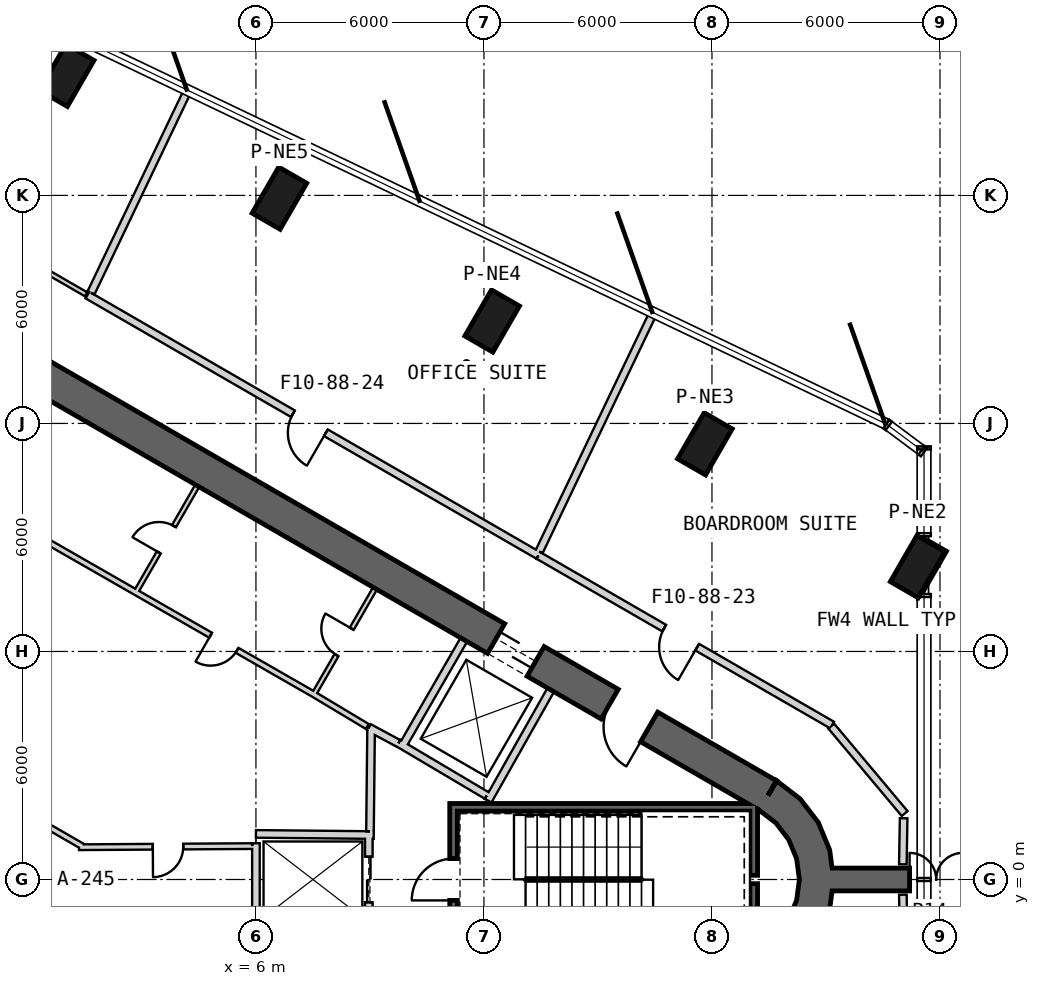
"""IFC4 building model, lengths in metres.
Left out: names, types, materials, properties, quantities, classifications, styles, units other than length and angle.
Written with IfcOpenShell. Run it as: python <this file> out.ifc"""

import sys

from ifc_helpers import new_model, si_unit, direction, frame, frame_2d, origin, origin_2d, place, context, subcontext, project, spatial, polyline, rectangle, outline, extrude, element, fill, save


model = new_model("IFC4")
c1 = context("Model", 3, precision=1e-05, world=origin(), true_north=direction((0.0, 1.0)))
c2 = subcontext(c1, "Body", "Model", "MODEL_VIEW")
j1 = project(units=[si_unit("LENGTHUNIT", "METRE"), si_unit("PLANEANGLEUNIT", "RADIAN")], contexts=[c1])
p1 = place(None, origin())
s1 = spatial("IfcSite", under=j1, at=p1, CompositionType="ELEMENT")
p2 = place(p1, origin())
s2 = spatial("IfcBuilding", under=s1, at=p2, CompositionType="ELEMENT")
p3 = place(p2, frame((0.0, 0.0, 380.6)))
s3 = spatial("IfcBuildingStorey", under=s2, at=p3, CompositionType="ELEMENT", Elevation=380.6)
for number, where, z_axis, x_axis in (
    (1, (23.412, 8.231, 0.0), (0.0, 0.0, 1.0), (0.5, 0.866, 0.0)),
    (2, (17.814, 11.463, 0.0), (0.0, 0.0, 1.0), (0.5, 0.866, 0.0)),
    (3, (12.216, 14.695, 0.0), (0.0, 0.0, 1.0), (0.5, 0.866, 0.0)),
    (4, (6.618, 17.927, 0.0), (0.0, 0.0, 1.0), (0.5, 0.866, 0.0)),
    (5, (1.02, 21.159, 0.0), (0.0, 0.0, 1.0), (0.5, 0.866, 0.0)),
):
    element("IfcColumn", number, at=place(p3, frame(where, z_axis=z_axis, x_axis=x_axis)), inside=s3, PredefinedType="COLUMN", context=c2, shape_type="SweptSolid", body=[
        extrude(rectangle(XDim=1.4, YDim=0.85, at=origin_2d()), origin(), (0.0, 0.0, 1.0), 3.9),
    ])
p4 = place(p3, frame((19.475, 2.208, 0.0), z_axis=(0.0, 0.0, 1.0), x_axis=(-0.866028369851, 0.499994862586, 0.0)))
e6 = element("IfcWall", 6, at=p4, inside=s3, PredefinedType="SHEAR", context=c2, shape_type="SweptSolid", body=[
    extrude(rectangle(XDim=31.523, YDim=0.9, at=frame_2d((15.762, 0.0))), origin(), (0.0, 0.0, 1.0), 3.9),
])
p5 = place(p4, frame((7.062, 0.0, 0.0)))
e7 = element("IfcOpeningElement", 7, at=p5, cuts=e6, PredefinedType="OPENING", context=c2, shape_type="SweptSolid", body=[
    extrude(rectangle(XDim=1.2, YDim=2.4, at=frame_2d((0.6, 1.2))), frame((0.0, 0.46, 0.0), z_axis=(0.0, -1.0, 0.0), x_axis=(1.0, 0.0, 0.0)), (0.0, 0.0, 1.0), 0.92),
])
p6 = place(p4, frame((3.612, 0.0, 0.0)))
e8 = element("IfcOpeningElement", 8, at=p6, cuts=e6, PredefinedType="OPENING", context=c2, shape_type="SweptSolid", body=[
    extrude(rectangle(XDim=1.2, YDim=2.4, at=frame_2d((0.6, 1.2))), frame((0.0, 0.46, 0.0), z_axis=(0.0, -1.0, 0.0), x_axis=(1.0, 0.0, 0.0)), (0.0, 0.0, 1.0), 0.92),
])
p7 = place(p4, frame((26.712, 0.0, 0.0)))
e9 = element("IfcOpeningElement", 9, at=p7, cuts=e6, PredefinedType="OPENING", context=c2, shape_type="SweptSolid", body=[
    extrude(rectangle(XDim=1.2, YDim=2.4, at=frame_2d((0.6, 1.2))), frame((0.0, 0.46, 0.0), z_axis=(0.0, -1.0, 0.0), x_axis=(1.0, 0.0, 0.0)), (0.0, 0.0, 1.0), 0.92),
])
p8 = place(p3, origin())
e10 = element("IfcWall", 10, at=p8, inside=s3, PredefinedType="SHEAR", context=c2, shape_type="SweptSolid", body=[
    extrude(outline(polyline([(19.7, -2.598), (20.321, -2.121), (20.798, -1.5), (21.098, -0.777), (21.2, 0.0), (21.098, 0.777), (20.798, 1.5), (20.321, 2.121), (19.7, 2.598), (19.25, 1.819), (19.685, 1.485), (20.019, 1.05), (20.229, 0.543), (20.3, 0.0), (20.229, -0.543), (20.019, -1.05), (19.685, -1.485), (19.25, -1.819), (19.7, -2.598)])), origin(), (0.0, 0.0, 1.0), 3.9),
])
p9 = place(p3, frame((21.15, 0.0, 0.0), z_axis=(0.0, 0.0, 1.0), x_axis=(1.0, 0.0, 0.0)))
e11 = element("IfcWall", 11, at=p9, inside=s3, PredefinedType="SHEAR", context=c2, shape_type="SweptSolid", body=[
    extrude(rectangle(XDim=6.455, YDim=0.6, at=frame_2d((3.228, 0.0))), origin(), (0.0, 0.0, 1.0), 3.9),
])
p10 = place(p9, frame((2.05, 0.0, 0.0)))
e12 = element("IfcOpeningElement", 12, at=p10, cuts=e11, PredefinedType="OPENING", context=c2, shape_type="SweptSolid", body=[
    extrude(rectangle(XDim=1.4, YDim=2.4, at=frame_2d((0.7, 1.2))), frame((0.0, 0.31, 0.0), z_axis=(0.0, -1.0, 0.0), x_axis=(1.0, 0.0, 0.0)), (0.0, 0.0, 1.0), 0.62),
])
p11 = place(p3, frame((23.426, 7.345, 1.1), z_axis=(0.0, 0.0, 1.0), x_axis=(0.499991248344, 0.866030456496, 0.0)))
e13 = element("IfcWall", 13, at=p11, inside=s3, PredefinedType="SOLIDWALL", context=c2, shape_type="SweptSolid", body=[
    extrude(rectangle(XDim=1.52, YDim=0.06, at=frame_2d((0.76, 0.0))), origin(), (0.0, 0.0, 1.0), 1.51),
])
p12 = place(p3, frame((24.145, 8.65, 0.0), z_axis=(0.0, 0.0, 1.0), x_axis=(-0.865989465428, 0.500062241894, 0.0)))
e14 = element("IfcWall", 14, at=p12, inside=s3, PredefinedType="SOLIDWALL", context=c2, shape_type="SweptSolid", body=[
    extrude(rectangle(XDim=0.85, YDim=0.06, at=frame_2d((0.425, 0.0))), origin(), (0.0, 0.0, 1.0), 3.21),
])
p13 = place(p3, frame((9.847, 3.495, 0.0), z_axis=(0.0, 0.0, 1.0), x_axis=(0.499984717929, 0.866034226713, 0.0)))
e15 = element("IfcWall", 15, at=p13, inside=s3, PredefinedType="PLUMBINGWALL", context=c2, shape_type="SweptSolid", body=[
    extrude(rectangle(XDim=3.25, YDim=0.2, at=frame_2d((1.625, 0.0))), origin(), (0.0, 0.0, 1.0), 3.6),
])
p14 = place(p3, frame((12.11, 2.073, 0.0), z_axis=(0.0, 0.0, 1.0), x_axis=(0.49196600604, 0.870614408852, 0.0)))
e16 = element("IfcWall", 16, at=p14, inside=s3, PredefinedType="PLUMBINGWALL", context=c2, shape_type="SweptSolid", body=[
    extrude(rectangle(XDim=3.35, YDim=0.2, at=frame_2d((1.675, 0.0))), origin(), (0.0, 0.0, 1.0), 3.6),
])
p15 = place(p3, frame((12.073, 2.211, 0.0), z_axis=(0.0, 0.0, 1.0), x_axis=(-0.860414880418, 0.509594185166, 0.0)))
e17 = element("IfcWall", 17, at=p15, inside=s3, PredefinedType="PLUMBINGWALL", context=c2, shape_type="SweptSolid", body=[
    extrude(rectangle(XDim=2.7, YDim=0.2, at=frame_2d((1.35, 0.0))), origin(), (0.0, 0.0, 1.0), 3.6),
])
p16 = place(p3, frame((19.2, 1.9, -0.3), z_axis=(0.0, 0.0, 1.0), x_axis=(-1.0, 0.0, 0.0)))
e18 = element("IfcWall", 18, at=p16, inside=s3, PredefinedType="SHEAR", context=c2, shape_type="SweptSolid", body=[
    extrude(rectangle(XDim=8.1, YDim=0.2, at=frame_2d((4.05, 0.0))), origin(), (0.0, 0.0, 1.0), 3.9),
])
p17 = place(p3, frame((19.1, -2.0, -0.3), z_axis=(0.0, 0.0, 1.0), x_axis=(0.0, 1.0, 0.0)))
e19 = element("IfcWall", 19, at=p17, inside=s3, PredefinedType="SHEAR", context=c2, shape_type="SweptSolid", body=[
    extrude(rectangle(XDim=1.89, YDim=0.2, at=frame_2d((0.945, 0.0))), origin(), (0.0, 0.0, 1.0), 3.9),
])
p18 = place(p3, frame((19.1, 0.11, -0.3), z_axis=(0.0, 0.0, 1.0), x_axis=(0.0, 1.0, 0.0)))
e20 = element("IfcWall", 20, at=p18, inside=s3, PredefinedType="SHEAR", context=c2, shape_type="SweptSolid", body=[
    extrude(rectangle(XDim=1.69, YDim=0.2, at=frame_2d((0.845, 0.0))), origin(), (0.0, 0.0, 1.0), 3.9),
])
p19 = place(p3, frame((11.2, -1.8, -0.3), z_axis=(0.0, 0.0, 1.0), x_axis=(0.0, 1.0, 0.0)))
e21 = element("IfcWall", 21, at=p19, inside=s3, PredefinedType="SHEAR", context=c2, shape_type="SweptSolid", body=[
    extrude(rectangle(XDim=3.6, YDim=0.2, at=frame_2d((1.8, 0.0))), origin(), (0.0, 0.0, 1.0), 3.9),
])
p20 = place(p19, frame((1.25, 0.0, 0.3)))
e22 = element("IfcOpeningElement", 22, at=p20, cuts=e21, PredefinedType="OPENING", context=c2, shape_type="SweptSolid", body=[
    extrude(rectangle(XDim=1.1, YDim=2.1, at=frame_2d((0.55, 1.05))), frame((0.0, 0.11, 0.0), z_axis=(0.0, -1.0, 0.0), x_axis=(1.0, 0.0, 0.0)), (0.0, 0.0, 1.0), 0.22),
])
p21 = place(p3, frame((8.97, 1.2, 0.0), z_axis=(0.0, 0.0, 1.0), x_axis=(0.0, -1.0, 0.0)))
e23 = element("IfcWall", 23, at=p21, inside=s3, PredefinedType="PLUMBINGWALL", context=c2, shape_type="SweptSolid", body=[
    extrude(rectangle(XDim=2.4, YDim=0.2, at=frame_2d((1.2, 0.0))), origin(), (0.0, 0.0, 1.0), 3.6),
])
p22 = place(p21, frame((0.6, 0.0, 0.0)))
e24 = element("IfcOpeningElement", 24, at=p22, cuts=e23, PredefinedType="OPENING", context=c2, shape_type="SweptSolid", body=[
    extrude(rectangle(XDim=1.2, YDim=2.4, at=frame_2d((0.6, 1.2))), frame((0.0, 0.11, 0.0), z_axis=(0.0, -1.0, 0.0), x_axis=(1.0, 0.0, 0.0)), (0.0, 0.0, 1.0), 0.22),
])
p23 = place(p3, frame((6.0, -1.104, 0.0), z_axis=(0.0, 0.0, 1.0), x_axis=(0.0, 1.0, 0.0)))
e25 = element("IfcWall", 25, at=p23, inside=s3, PredefinedType="PLUMBINGWALL", context=c2, shape_type="SweptSolid", body=[
    extrude(rectangle(XDim=2.405, YDim=0.2, at=frame_2d((1.202, 0.0))), origin(), (0.0, 0.0, 1.0), 3.6),
])
p24 = place(p3, frame((9.1, 1.169, 0.0), z_axis=(0.0, 0.0, 1.0), x_axis=(-0.99994990606, 0.010009264196, 0.0)))
e26 = element("IfcWall", 26, at=p24, inside=s3, PredefinedType="PLUMBINGWALL", context=c2, shape_type="SweptSolid", body=[
    extrude(rectangle(XDim=3.0, YDim=0.2, at=frame_2d((1.5, 0.0))), origin(), (0.0, 0.0, 1.0), 3.6),
])
p25 = place(p3, frame((4.457, 10.359, 0.0), z_axis=(0.0, 0.0, 1.0), x_axis=(-0.500017246033, -0.866015446554, 0.0)))
e27 = element("IfcWall", 27, at=p25, inside=s3, PredefinedType="PARTITIONING", context=c2, shape_type="SweptSolid", body=[
    extrude(rectangle(XDim=3.25, YDim=0.12, at=frame_2d((1.625, 0.0))), origin(), (0.0, 0.0, 1.0), 3.6),
])
p26 = place(p3, frame((8.974, 3.999, 0.0), z_axis=(0.0, 0.0, 1.0), x_axis=(0.880917147855, -0.473270513147, 0.0)))
e28 = element("IfcWall", 28, at=p26, inside=s3, PredefinedType="PARTITIONING", context=c2, shape_type="SweptSolid", body=[
    extrude(rectangle(XDim=0.878, YDim=0.2, at=frame_2d((0.439, 0.0))), origin(), (0.0, 0.0, 1.0), 3.6),
])
p27 = place(p3, frame((7.53, 4.833, 0.0), z_axis=(0.0, 0.0, 1.0), x_axis=(-0.863270393362, 0.50474174381, 0.0)))
e29 = element("IfcWall", 29, at=p27, inside=s3, PredefinedType="PLUMBINGWALL", context=c2, shape_type="SweptSolid", body=[
    extrude(rectangle(XDim=5.455, YDim=0.15, at=frame_2d((2.728, 0.0))), origin(), (0.0, 0.0, 1.0), 3.6),
])
p28 = place(p3, frame((7.55, 4.821, 0.0), z_axis=(0.0, 0.0, 1.0), x_axis=(0.866019818373, -0.500009674092, 0.0)))
e30 = element("IfcWall", 30, at=p28, inside=s3, PredefinedType="PARTITIONING", context=c2, shape_type="SweptSolid", body=[
    extrude(rectangle(XDim=1.594, YDim=0.12, at=frame_2d((0.797, 0.0))), origin(), (0.0, 0.0, 1.0), 3.6),
])
p29 = place(p28, frame((0.397, 0.0, 0.0)))
e31 = element("IfcOpeningElement", 31, at=p29, cuts=e30, PredefinedType="OPENING", context=c2, shape_type="SweptSolid", body=[
    extrude(rectangle(XDim=0.8, YDim=2.1, at=frame_2d((0.4, 1.05))), frame((0.0, 0.07, 0.0), z_axis=(0.0, -1.0, 0.0), x_axis=(1.0, 0.0, 0.0)), (0.0, 0.0, 1.0), 0.14),
])
p30 = place(p3, frame((2.821, 7.586, 0.0), z_axis=(0.0, 0.0, 1.0), x_axis=(-0.871409832999, 0.490555708306, 0.0)))
e32 = element("IfcWall", 32, at=p30, inside=s3, PredefinedType="PLUMBINGWALL", context=c2, shape_type="SweptSolid", body=[
    extrude(rectangle(XDim=2.755, YDim=0.15, at=frame_2d((1.377, 0.0))), origin(), (0.0, 0.0, 1.0), 3.6),
])
p31 = place(p3, frame((9.001, 1.27, 0.0), z_axis=(0.0, 0.0, 1.0), x_axis=(0.010723968736, 0.999942496594, 0.0)))
e33 = element("IfcWall", 33, at=p31, inside=s3, PredefinedType="PARTITIONING", context=c2, shape_type="SweptSolid", body=[
    extrude(rectangle(XDim=2.709, YDim=0.2, at=frame_2d((1.354, 0.0))), origin(), (0.0, 0.0, 1.0), 3.6),
])
p32 = place(p31, frame((0.848, 0.0, 0.0)))
e34 = element("IfcOpeningElement", 34, at=p32, cuts=e33, PredefinedType="OPENING", context=c2, shape_type="SweptSolid", body=[
    extrude(rectangle(XDim=1.0, YDim=2.1, at=frame_2d((0.5, 1.05))), frame((0.0, 0.11, 0.0), z_axis=(0.0, -1.0, 0.0), x_axis=(1.0, 0.0, 0.0)), (0.0, 0.0, 1.0), 0.22),
])
p33 = place(p3, frame((7.501, 2.625, 0.0), z_axis=(0.0, 0.0, 1.0), x_axis=(-0.011798588722, 0.99993039423, 0.0)))
e35 = element("IfcWall", 35, at=p33, inside=s3, PredefinedType="PLUMBINGWALL", context=c2, shape_type="SweptSolid", body=[
    extrude(rectangle(XDim=2.152, YDim=0.15, at=frame_2d((1.076, 0.0))), origin(), (0.0, 0.0, 1.0), 3.6),
])
p34 = place(p3, frame((4.425, 2.7, 0.0), z_axis=(0.0, 0.0, 1.0), x_axis=(1.0, 0.0, 0.0)))
e36 = element("IfcWall", 36, at=p34, inside=s3, PredefinedType="PLUMBINGWALL", context=c2, shape_type="SweptSolid", body=[
    extrude(rectangle(XDim=3.0, YDim=0.15, at=frame_2d((1.5, 0.0))), origin(), (0.0, 0.0, 1.0), 3.6),
])
p35 = place(p34, frame((1.137, 0.0, 0.0)))
e37 = element("IfcOpeningElement", 37, at=p35, cuts=e36, PredefinedType="OPENING", context=c2, shape_type="SweptSolid", body=[
    extrude(rectangle(XDim=0.8, YDim=2.1, at=frame_2d((0.4, 1.05))), frame((0.0, 0.085, 0.0), z_axis=(0.0, -1.0, 0.0), x_axis=(1.0, 0.0, 0.0)), (0.0, 0.0, 1.0), 0.17),
])
p36 = place(p3, frame((4.5, 0.925, 0.0), z_axis=(0.0, 0.0, 1.0), x_axis=(0.0, 1.0, 0.0)))
e38 = element("IfcWall", 38, at=p36, inside=s3, PredefinedType="PLUMBINGWALL", context=c2, shape_type="SweptSolid", body=[
    extrude(rectangle(XDim=1.7, YDim=0.15, at=frame_2d((0.85, 0.0))), origin(), (0.0, 0.0, 1.0), 3.6),
])
p37 = place(p3, frame((1.516, 1.0, 0.0), z_axis=(0.0, 0.0, 1.0), x_axis=(1.0, 0.0, 0.0)))
e39 = element("IfcWall", 39, at=p37, inside=s3, PredefinedType="PLUMBINGWALL", context=c2, shape_type="SweptSolid", body=[
    extrude(rectangle(XDim=2.909, YDim=0.15, at=frame_2d((1.455, 0.0))), origin(), (0.0, 0.0, 1.0), 3.6),
])
p38 = place(p3, frame((-0.069, 1.99, 0.0), z_axis=(0.0, 0.0, 1.0), x_axis=(0.866015184065, -0.500017700655, 0.0)))
e40 = element("IfcWall", 40, at=p38, inside=s3, PredefinedType="PLUMBINGWALL", context=c2, shape_type="SweptSolid", body=[
    extrude(rectangle(XDim=1.957, YDim=0.15, at=frame_2d((0.978, 0.0))), origin(), (0.0, 0.0, 1.0), 3.6),
])
p39 = place(p3, frame((21.126, 4.084, 0.0), z_axis=(0.0, 0.0, 1.0), x_axis=(-0.866025296335, 0.500000186108, 0.0)))
e41 = element("IfcWall", 41, at=p39, inside=s3, PredefinedType="PARTITIONING", context=c2, shape_type="SweptSolid", body=[
    extrude(rectangle(XDim=22.523, YDim=0.12, at=frame_2d((11.262, 0.0))), origin(), (0.0, 0.0, 1.0), 2.97),
])
p40 = place(p39, frame((10.86, 0.0, 0.0)))
e42 = element("IfcOpeningElement", 42, at=p40, cuts=e41, PredefinedType="OPENING", context=c2, shape_type="SweptSolid", body=[
    extrude(rectangle(XDim=1.0, YDim=2.1, at=frame_2d((0.5, 1.05))), frame((0.0, 0.07, 0.0), z_axis=(0.0, -1.0, 0.0), x_axis=(1.0, 0.0, 0.0)), (0.0, 0.0, 1.0), 0.14),
])
p41 = place(p3, frame((1.62, 15.346, 0.0), z_axis=(0.0, 0.0, 1.0), x_axis=(-0.866024423855, 0.500001697284, 0.0)))
e43 = element("IfcWall", 43, at=p41, inside=s3, PredefinedType="PARTITIONING", context=c2, shape_type="SweptSolid", body=[
    extrude(rectangle(XDim=9.864, YDim=0.12, at=frame_2d((4.932, 0.0))), origin(), (0.0, 0.0, 1.0), 2.97),
])
p42 = place(p41, frame((4.435, 0.0, 0.0)))
e44 = element("IfcOpeningElement", 44, at=p42, cuts=e43, PredefinedType="OPENING", context=c2, shape_type="SweptSolid", body=[
    extrude(rectangle(XDim=1.0, YDim=2.1, at=frame_2d((0.5, 1.05))), frame((0.0, 0.07, 0.0), z_axis=(0.0, -1.0, 0.0), x_axis=(1.0, 0.0, 0.0)), (0.0, 0.0, 1.0), 0.14),
])
p43 = place(p3, frame((23.061, 1.747, 0.0), z_axis=(0.0, 0.0, 1.0), x_axis=(-0.642780078291, 0.766050762647, 0.0)))
e45 = element("IfcWall", 45, at=p43, inside=s3, PredefinedType="PARTITIONING", context=c2, shape_type="SweptSolid", body=[
    extrude(rectangle(XDim=3.03, YDim=0.12, at=frame_2d((1.515, 0.0))), origin(), (0.0, 0.0, 1.0), 3.6),
])
p44 = place(p3, frame((23.023, 0.4, 0.0), z_axis=(0.0, 0.0, 1.0), x_axis=(0.017073489471, 0.999854237355, 0.0)))
e46 = element("IfcWall", 46, at=p44, inside=s3, PredefinedType="PARTITIONING", context=c2, shape_type="SweptSolid", body=[
    extrude(rectangle(XDim=1.273, YDim=0.12, at=frame_2d((0.636, 0.0))), origin(), (0.0, 0.0, 1.0), 3.6),
])
p45 = place(p3, frame((4.207, 20.766, 0.0), z_axis=(0.0, 0.0, 1.0), x_axis=(-0.431077681357, -0.902314819027, 0.0)))
e47 = element("IfcWall", 47, at=p45, inside=s3, PredefinedType="PARTITIONING", context=c2, shape_type="SweptSolid", body=[
    extrude(rectangle(XDim=5.946, YDim=0.12, at=frame_2d((2.973, 0.0))), origin(), (0.0, 0.0, 1.0), 3.6),
])
p46 = place(p3, frame((23.047, -1.801, 0.0), z_axis=(0.0, 0.0, 1.0), x_axis=(-0.017070682919, 0.999854285276, 0.0)))
e48 = element("IfcWall", 48, at=p46, inside=s3, PredefinedType="PARTITIONING", context=c2, shape_type="SweptSolid", body=[
    extrude(rectangle(XDim=1.402, YDim=0.2, at=frame_2d((0.701, 0.0))), origin(), (0.0, 0.0, 1.0), 3.6),
])
p47 = place(p20, origin())
e49 = element("IfcDoor", 49, at=p47, inside=s3, OperationType="SINGLE_SWING_RIGHT", PredefinedType="USERDEFINED", context=c2, shape_type="SweptSolid", body=[
    extrude(rectangle(XDim=1.1, YDim=2.1, at=frame_2d((0.55, 1.05))), frame((0.0, 0.025, 0.0), z_axis=(0.0, -1.0, 0.0), x_axis=(1.0, 0.0, 0.0)), (0.0, 0.0, 1.0), 0.05),
])
fill(e22, e49)
p48 = place(p32, origin())
e50 = element("IfcDoor", 50, at=p48, inside=s3, OperationType="SINGLE_SWING_RIGHT", PredefinedType="USERDEFINED", context=c2, shape_type="SweptSolid", body=[
    extrude(rectangle(XDim=1.0, YDim=2.1, at=frame_2d((0.5, 1.05))), frame((0.0, 0.025, 0.0), z_axis=(0.0, -1.0, 0.0), x_axis=(1.0, 0.0, 0.0)), (0.0, 0.0, 1.0), 0.05),
])
fill(e34, e50)
p49 = place(p22, origin())
e51 = element("IfcDoor", 51, at=p49, inside=s3, OperationType="SLIDING_TO_LEFT", PredefinedType="USERDEFINED", context=c2, shape_type="SweptSolid", body=[
    extrude(rectangle(XDim=1.2, YDim=2.4, at=frame_2d((0.6, 1.2))), frame((0.0, 0.025, 0.0), z_axis=(0.0, -1.0, 0.0), x_axis=(1.0, 0.0, 0.0)), (0.0, 0.0, 1.0), 0.05),
])
fill(e24, e51)
p50 = place(p35, origin())
e52 = element("IfcDoor", 52, at=p50, inside=s3, OperationType="SINGLE_SWING_RIGHT", PredefinedType="USERDEFINED", context=c2, shape_type="SweptSolid", body=[
    extrude(rectangle(XDim=0.8, YDim=2.1, at=frame_2d((0.4, 1.05))), frame((0.0, 0.025, 0.0), z_axis=(0.0, -1.0, 0.0), x_axis=(1.0, 0.0, 0.0)), (0.0, 0.0, 1.0), 0.05),
])
fill(e37, e52)
p51 = place(p29, origin())
e53 = element("IfcDoor", 53, at=p51, inside=s3, OperationType="SINGLE_SWING_LEFT", PredefinedType="USERDEFINED", context=c2, shape_type="SweptSolid", body=[
    extrude(rectangle(XDim=0.8, YDim=2.1, at=frame_2d((0.4, 1.05))), frame((0.0, 0.025, 0.0), z_axis=(0.0, -1.0, 0.0), x_axis=(1.0, 0.0, 0.0)), (0.0, 0.0, 1.0), 0.05),
])
fill(e31, e53)
p52 = place(p40, origin())
e54 = element("IfcDoor", 54, at=p52, inside=s3, OperationType="SINGLE_SWING_LEFT", PredefinedType="NOTDEFINED", context=c2, shape_type="SweptSolid", body=[
    extrude(rectangle(XDim=1.0, YDim=2.1, at=frame_2d((0.5, 1.05))), frame((0.0, 0.025, 0.0), z_axis=(0.0, -1.0, 0.0), x_axis=(1.0, 0.0, 0.0)), (0.0, 0.0, 1.0), 0.05),
])
fill(e42, e54)
p53 = place(p5, origin())
e55 = element("IfcDoor", 55, at=p53, inside=s3, OperationType="SLIDING_TO_LEFT", PredefinedType="USERDEFINED", context=c2, shape_type="SweptSolid", body=[
    extrude(rectangle(XDim=1.2, YDim=2.4, at=frame_2d((0.6, 1.2))), frame((0.0, 0.025, 0.0), z_axis=(0.0, -1.0, 0.0), x_axis=(1.0, 0.0, 0.0)), (0.0, 0.0, 1.0), 0.05),
])
fill(e7, e55)
p54 = place(p6, origin())
e56 = element("IfcDoor", 56, at=p54, inside=s3, OperationType="SINGLE_SWING_LEFT", PredefinedType="USERDEFINED", context=c2, shape_type="SweptSolid", body=[
    extrude(rectangle(XDim=1.2, YDim=2.4, at=frame_2d((0.6, 1.2))), frame((0.0, 0.025, 0.0), z_axis=(0.0, -1.0, 0.0), x_axis=(1.0, 0.0, 0.0)), (0.0, 0.0, 1.0), 0.05),
])
fill(e8, e56)
p55 = place(p10, origin())
e57 = element("IfcDoor", 57, at=p55, inside=s3, OperationType="DOUBLE_DOOR_SINGLE_SWING", PredefinedType="NOTDEFINED", context=c2, shape_type="SweptSolid", body=[
    extrude(rectangle(XDim=1.4, YDim=2.4, at=frame_2d((0.7, 1.2))), frame((0.0, 0.025, 0.0), z_axis=(0.0, -1.0, 0.0), x_axis=(1.0, 0.0, 0.0)), (0.0, 0.0, 1.0), 0.05),
])
fill(e12, e57)
save(model, sys.argv[1])
